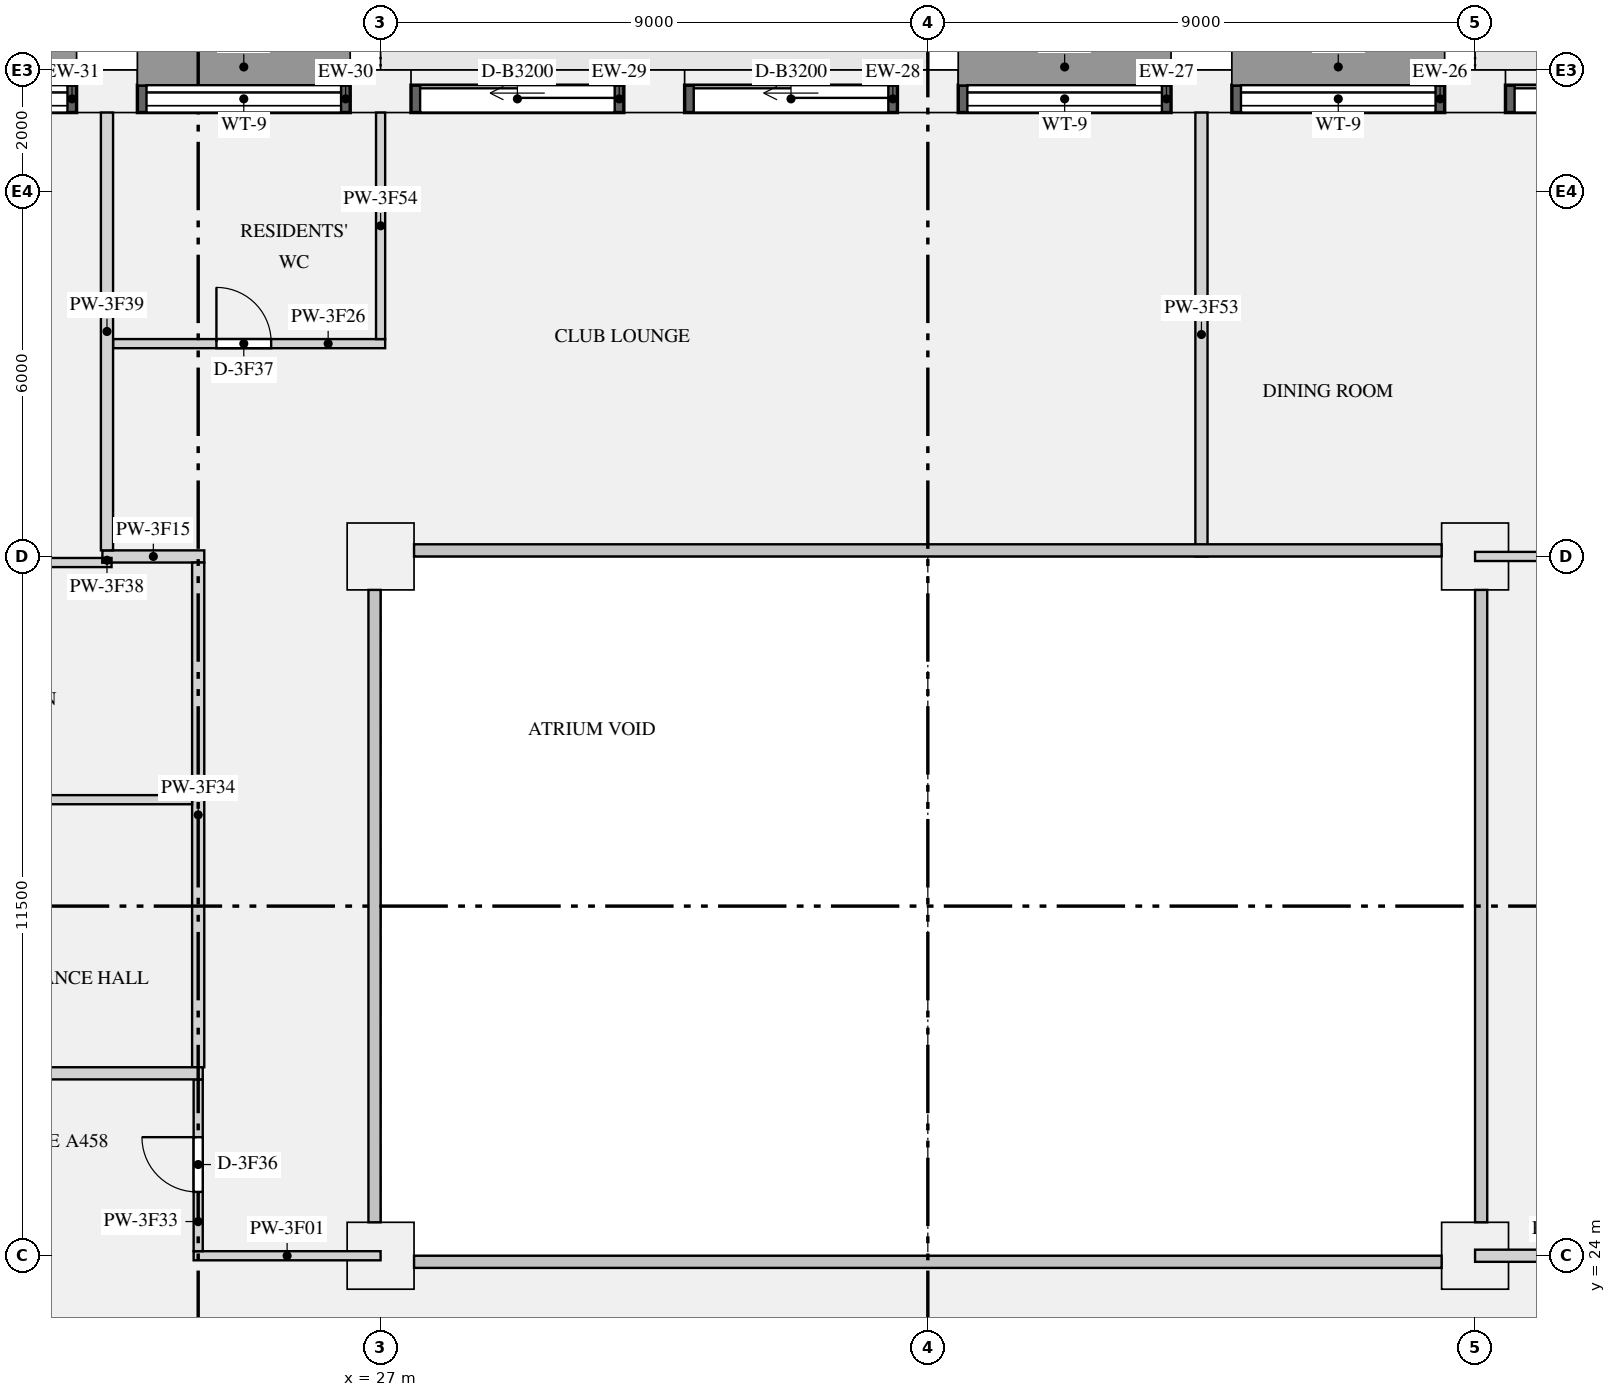
"""IFC4 building model, lengths in metres.
Left out: names, types, materials, properties, quantities, classifications, styles, units other than length and angle.
Written with IfcOpenShell. Run it as: python <this file> out.ifc"""

import sys

from ifc_helpers import new_model, si_unit, direction, frame, frame_2d, origin, origin_2d, place, context, subcontext, project, spatial, rectangle, extrude, element, fill, save


model = new_model("IFC4")
c1 = context("Model", 3, precision=1e-05, world=origin(), true_north=direction((0.0, 1.0)))
c2 = subcontext(c1, "Body", "Model", "MODEL_VIEW")
j1 = project(units=[si_unit("LENGTHUNIT", "METRE"), si_unit("PLANEANGLEUNIT", "RADIAN")], contexts=[c1])
p1 = place(None, origin())
s1 = spatial("IfcSite", under=j1, at=p1, CompositionType="ELEMENT")
p2 = place(p1, origin())
s2 = spatial("IfcBuilding", under=s1, at=p2, CompositionType="ELEMENT")
p3 = place(p2, frame((0.0, 0.0, 179.1)))
s3 = spatial("IfcBuildingStorey", under=s2, at=p3, CompositionType="ELEMENT", Elevation=179.1)
for number, where, z_axis, x_axis in (
    (1, (45.0, 43.15, 0.0), (0.0, 0.0, 1.0), (-1.0, 0.0, 0.0)),
    (2, (40.5, 43.15, 0.0), (0.0, 0.0, 1.0), (-1.0, 0.0, 0.0)),
    (3, (36.0, 43.15, 0.0), (0.0, 0.0, 1.0), (-1.0, 0.0, 0.0)),
    (4, (31.5, 43.15, 0.0), (0.0, 0.0, 1.0), (-1.0, 0.0, 0.0)),
    (5, (27.0, 43.15, 0.0), (0.0, 0.0, 1.0), (-1.0, 0.0, 0.0)),
    (6, (22.5, 43.15, 0.0), (0.0, 0.0, 1.0), (-1.0, 0.0, 0.0)),
):
    element("IfcColumn", number, at=place(p3, frame(where, z_axis=z_axis, x_axis=x_axis)), inside=s3, PredefinedType="USERDEFINED", context=c2, shape_type="SweptSolid", body=[
        extrude(rectangle(XDim=1.0, YDim=0.7, at=origin_2d()), origin(), (0.0, 0.0, 1.0), 3.15),
    ])
for number, where, z_axis, x_axis in (
    (7, (27.0, 24.0, 0.0), (0.0, 0.0, 1.0), (1.0, 0.0, 0.0)),
    (8, (45.0, 24.0, 0.0), (0.0, 0.0, 1.0), (1.0, 0.0, 0.0)),
    (9, (27.0, 35.5, 0.0), (0.0, 0.0, 1.0), (1.0, 0.0, 0.0)),
    (10, (45.0, 35.5, 0.0), (0.0, 0.0, 1.0), (1.0, 0.0, 0.0)),
):
    element("IfcColumn", number, at=place(p3, frame(where, z_axis=z_axis, x_axis=x_axis)), inside=s3, PredefinedType="COLUMN", context=c2, shape_type="SweptSolid", body=[
        extrude(rectangle(XDim=1.1, YDim=1.1, at=origin_2d()), origin(), (0.0, 0.0, 1.0), 3.15),
    ])
p4 = place(p3, frame((49.0, 43.025, 0.0), z_axis=(0.0, 0.0, 1.0), x_axis=(-1.0, 0.0, 0.0)))
e11 = element("IfcWall", 11, at=p4, inside=s3, PredefinedType="SOLIDWALL", context=c2, shape_type="SweptSolid", body=[
    extrude(rectangle(XDim=3.5, YDim=0.45, at=frame_2d((1.75, 0.0))), origin(), (0.0, 0.0, 1.0), 2.83),
])
p5 = place(p4, frame((0.15, 0.0, 0.0)))
e12 = element("IfcOpeningElement", 12, at=p5, cuts=e11, PredefinedType="OPENING", context=c2, shape_type="SweptSolid", body=[
    extrude(rectangle(XDim=3.2, YDim=2.3, at=frame_2d((1.6, 1.15))), frame((0.0, 0.235, 0.0), z_axis=(0.0, -1.0, 0.0), x_axis=(1.0, 0.0, 0.0)), (0.0, 0.0, 1.0), 0.47),
])
p6 = place(p3, frame((44.5, 43.025, 0.9), z_axis=(0.0, 0.0, 1.0), x_axis=(-1.0, 0.0, 0.0)))
e13 = element("IfcWall", 13, at=p6, inside=s3, PredefinedType="SOLIDWALL", context=c2, shape_type="SweptSolid", body=[
    extrude(rectangle(XDim=3.5, YDim=0.45, at=frame_2d((1.75, 0.0))), origin(), (0.0, 0.0, 1.0), 1.93),
])
p7 = place(p6, frame((0.15, 0.0, 0.15)))
e14 = element("IfcOpeningElement", 14, at=p7, cuts=e13, PredefinedType="OPENING", context=c2, shape_type="SweptSolid", body=[
    extrude(rectangle(XDim=3.2, YDim=1.5, at=frame_2d((1.6, 0.75))), frame((0.0, 0.235, 0.0), z_axis=(0.0, -1.0, 0.0), x_axis=(1.0, 0.0, 0.0)), (0.0, 0.0, 1.0), 0.47),
])
p8 = place(p3, frame((40.0, 43.025, 0.9), z_axis=(0.0, 0.0, 1.0), x_axis=(-1.0, 0.0, 0.0)))
e15 = element("IfcWall", 15, at=p8, inside=s3, PredefinedType="SOLIDWALL", context=c2, shape_type="SweptSolid", body=[
    extrude(rectangle(XDim=3.5, YDim=0.45, at=frame_2d((1.75, 0.0))), origin(), (0.0, 0.0, 1.0), 1.93),
])
p9 = place(p8, frame((0.15, 0.0, 0.15)))
e16 = element("IfcOpeningElement", 16, at=p9, cuts=e15, PredefinedType="OPENING", context=c2, shape_type="SweptSolid", body=[
    extrude(rectangle(XDim=3.2, YDim=1.5, at=frame_2d((1.6, 0.75))), frame((0.0, 0.235, 0.0), z_axis=(0.0, -1.0, 0.0), x_axis=(1.0, 0.0, 0.0)), (0.0, 0.0, 1.0), 0.47),
])
p10 = place(p3, frame((35.5, 43.025, 0.0), z_axis=(0.0, 0.0, 1.0), x_axis=(-1.0, 0.0, 0.0)))
e17 = element("IfcWall", 17, at=p10, inside=s3, PredefinedType="SOLIDWALL", context=c2, shape_type="SweptSolid", body=[
    extrude(rectangle(XDim=3.5, YDim=0.45, at=frame_2d((1.75, 0.0))), origin(), (0.0, 0.0, 1.0), 2.83),
])
p11 = place(p10, frame((0.15, 0.0, 0.0)))
e18 = element("IfcOpeningElement", 18, at=p11, cuts=e17, PredefinedType="OPENING", context=c2, shape_type="SweptSolid", body=[
    extrude(rectangle(XDim=3.2, YDim=2.3, at=frame_2d((1.6, 1.15))), frame((0.0, 0.235, 0.0), z_axis=(0.0, -1.0, 0.0), x_axis=(1.0, 0.0, 0.0)), (0.0, 0.0, 1.0), 0.47),
])
p12 = place(p3, frame((31.0, 43.025, 0.0), z_axis=(0.0, 0.0, 1.0), x_axis=(-1.0, 0.0, 0.0)))
e19 = element("IfcWall", 19, at=p12, inside=s3, PredefinedType="SOLIDWALL", context=c2, shape_type="SweptSolid", body=[
    extrude(rectangle(XDim=3.5, YDim=0.45, at=frame_2d((1.75, 0.0))), origin(), (0.0, 0.0, 1.0), 2.83),
])
p13 = place(p12, frame((0.15, 0.0, 0.0)))
e20 = element("IfcOpeningElement", 20, at=p13, cuts=e19, PredefinedType="OPENING", context=c2, shape_type="SweptSolid", body=[
    extrude(rectangle(XDim=3.2, YDim=2.3, at=frame_2d((1.6, 1.15))), frame((0.0, 0.235, 0.0), z_axis=(0.0, -1.0, 0.0), x_axis=(1.0, 0.0, 0.0)), (0.0, 0.0, 1.0), 0.47),
])
p14 = place(p3, frame((26.5, 43.025, 0.9), z_axis=(0.0, 0.0, 1.0), x_axis=(-1.0, 0.0, 0.0)))
e21 = element("IfcWall", 21, at=p14, inside=s3, PredefinedType="SOLIDWALL", context=c2, shape_type="SweptSolid", body=[
    extrude(rectangle(XDim=3.5, YDim=0.45, at=frame_2d((1.75, 0.0))), origin(), (0.0, 0.0, 1.0), 1.93),
])
p15 = place(p14, frame((0.15, 0.0, 0.15)))
e22 = element("IfcOpeningElement", 22, at=p15, cuts=e21, PredefinedType="OPENING", context=c2, shape_type="SweptSolid", body=[
    extrude(rectangle(XDim=3.2, YDim=1.5, at=frame_2d((1.6, 0.75))), frame((0.0, 0.235, 0.0), z_axis=(0.0, -1.0, 0.0), x_axis=(1.0, 0.0, 0.0)), (0.0, 0.0, 1.0), 0.47),
])
p16 = place(p3, frame((22.0, 43.025, 0.9), z_axis=(0.0, 0.0, 1.0), x_axis=(-1.0, 0.0, 0.0)))
e23 = element("IfcWall", 23, at=p16, inside=s3, PredefinedType="SOLIDWALL", context=c2, shape_type="SweptSolid", body=[
    extrude(rectangle(XDim=3.5, YDim=0.45, at=frame_2d((1.75, 0.0))), origin(), (0.0, 0.0, 1.0), 1.93),
])
p17 = place(p16, frame((0.15, 0.0, 0.15)))
e24 = element("IfcOpeningElement", 24, at=p17, cuts=e23, PredefinedType="OPENING", context=c2, shape_type="SweptSolid", body=[
    extrude(rectangle(XDim=3.2, YDim=1.5, at=frame_2d((1.6, 0.75))), frame((0.0, 0.235, 0.0), z_axis=(0.0, -1.0, 0.0), x_axis=(1.0, 0.0, 0.0)), (0.0, 0.0, 1.0), 0.47),
])
p18 = place(p3, frame((23.925, 24.0, 0.0), z_axis=(0.0, 0.0, 1.0), x_axis=(1.0, 0.0, 0.0)))
e25 = element("IfcWall", 25, at=p18, inside=s3, PredefinedType="PARTITIONING", context=c2, shape_type="SweptSolid", body=[
    extrude(rectangle(XDim=3.075, YDim=0.15, at=frame_2d((1.538, 0.0))), origin(), (0.0, 0.0, 1.0), 2.83),
])
p19 = place(p3, frame((45.0, 24.0, 0.0), z_axis=(0.0, 0.0, 1.0), x_axis=(1.0, 0.0, 0.0)))
e26 = element("IfcWall", 26, at=p19, inside=s3, PredefinedType="PARTITIONING", context=c2, shape_type="SweptSolid", body=[
    extrude(rectangle(XDim=3.1, YDim=0.2, at=frame_2d((1.55, 0.0))), origin(), (0.0, 0.0, 1.0), 2.83),
])
p20 = place(p3, frame((17.1, 27.0, 0.0), z_axis=(0.0, 0.0, 1.0), x_axis=(1.0, 0.0, 0.0)))
e27 = element("IfcWall", 27, at=p20, inside=s3, PredefinedType="PARTITIONING", context=c2, shape_type="SweptSolid", body=[
    extrude(rectangle(XDim=6.975, YDim=0.2, at=frame_2d((3.487, 0.0))), origin(), (0.0, 0.0, 1.0), 2.83),
])
p21 = place(p20, frame((3.35, 0.0, 0.0)))
e28 = element("IfcOpeningElement", 28, at=p21, cuts=e27, PredefinedType="OPENING", context=c2, shape_type="SweptSolid", body=[
    extrude(rectangle(XDim=1.1, YDim=2.1, at=frame_2d((0.55, 1.05))), frame((0.0, 0.11, 0.0), z_axis=(0.0, -1.0, 0.0), x_axis=(1.0, 0.0, 0.0)), (0.0, 0.0, 1.0), 0.22),
])
p22 = place(p3, frame((15.8, 31.5, 0.0), z_axis=(0.0, 0.0, 1.0), x_axis=(1.0, 0.0, 0.0)))
e29 = element("IfcWall", 29, at=p22, inside=s3, PredefinedType="PARTITIONING", context=c2, shape_type="SweptSolid", body=[
    extrude(rectangle(XDim=8.1, YDim=0.15, at=frame_2d((4.05, 0.0))), origin(), (0.0, 0.0, 1.0), 2.83),
])
p23 = place(p22, frame((4.0, 0.0, 0.0)))
e30 = element("IfcOpeningElement", 30, at=p23, cuts=e29, PredefinedType="OPENING", context=c2, shape_type="SweptSolid", body=[
    extrude(rectangle(XDim=0.9, YDim=2.1, at=frame_2d((0.45, 1.05))), frame((0.0, 0.085, 0.0), z_axis=(0.0, -1.0, 0.0), x_axis=(1.0, 0.0, 0.0)), (0.0, 0.0, 1.0), 0.17),
])
p24 = place(p3, frame((15.8, 35.4, 0.0), z_axis=(0.0, 0.0, 1.0), x_axis=(1.0, 0.0, 0.0)))
e31 = element("IfcWall", 31, at=p24, inside=s3, PredefinedType="PARTITIONING", context=c2, shape_type="SweptSolid", body=[
    extrude(rectangle(XDim=6.775, YDim=0.15, at=frame_2d((3.387, 0.0))), origin(), (0.0, 0.0, 1.0), 2.83),
])
p25 = place(p24, frame((3.975, 0.0, 0.0)))
e32 = element("IfcOpeningElement", 32, at=p25, cuts=e31, PredefinedType="OPENING", context=c2, shape_type="SweptSolid", body=[
    extrude(rectangle(XDim=1.5, YDim=2.1, at=frame_2d((0.75, 1.05))), frame((0.0, 0.085, 0.0), z_axis=(0.0, -1.0, 0.0), x_axis=(1.0, 0.0, 0.0)), (0.0, 0.0, 1.0), 0.17),
])
p26 = place(p3, frame((45.0, 35.5, 0.0), z_axis=(0.0, 0.0, 1.0), x_axis=(1.0, 0.0, 0.0)))
e33 = element("IfcWall", 33, at=p26, inside=s3, PredefinedType="PARTITIONING", context=c2, shape_type="SweptSolid", body=[
    extrude(rectangle(XDim=4.425, YDim=0.15, at=frame_2d((2.212, 0.0))), origin(), (0.0, 0.0, 1.0), 2.83),
])
p27 = place(p3, frame((22.425, 35.5, 0.0), z_axis=(0.0, 0.0, 1.0), x_axis=(1.0, 0.0, 0.0)))
e34 = element("IfcWall", 34, at=p27, inside=s3, PredefinedType="PARTITIONING", context=c2, shape_type="SweptSolid", body=[
    extrude(rectangle(XDim=1.675, YDim=0.2, at=frame_2d((0.837, 0.0))), origin(), (0.0, 0.0, 1.0), 2.83),
])
p28 = place(p3, frame((22.6, 39.0, 0.0), z_axis=(0.0, 0.0, 1.0), x_axis=(1.0, 0.0, 0.0)))
e35 = element("IfcWall", 35, at=p28, inside=s3, PredefinedType="PARTITIONING", context=c2, shape_type="SweptSolid", body=[
    extrude(rectangle(XDim=4.475, YDim=0.15, at=frame_2d((2.237, 0.0))), origin(), (0.0, 0.0, 1.0), 2.83),
])
p29 = place(p28, frame((1.7, 0.0, 0.0)))
e36 = element("IfcOpeningElement", 36, at=p29, cuts=e35, PredefinedType="OPENING", context=c2, shape_type="SweptSolid", body=[
    extrude(rectangle(XDim=0.9, YDim=2.1, at=frame_2d((0.45, 1.05))), frame((0.0, 0.085, 0.0), z_axis=(0.0, -1.0, 0.0), x_axis=(1.0, 0.0, 0.0)), (0.0, 0.0, 1.0), 0.17),
])
p30 = place(p3, frame((24.0, 24.075, 0.0), z_axis=(0.0, 0.0, 1.0), x_axis=(0.0, 1.0, 0.0)))
e37 = element("IfcWall", 37, at=p30, inside=s3, PredefinedType="PARTITIONING", context=c2, shape_type="SweptSolid", body=[
    extrude(rectangle(XDim=2.825, YDim=0.15, at=frame_2d((1.413, 0.0))), origin(), (0.0, 0.0, 1.0), 2.83),
])
p31 = place(p30, frame((0.975, 0.0, 0.0)))
e38 = element("IfcOpeningElement", 38, at=p31, cuts=e37, PredefinedType="OPENING", context=c2, shape_type="SweptSolid", body=[
    extrude(rectangle(XDim=0.9, YDim=2.1, at=frame_2d((0.45, 1.05))), frame((0.0, 0.085, 0.0), z_axis=(0.0, -1.0, 0.0), x_axis=(1.0, 0.0, 0.0)), (0.0, 0.0, 1.0), 0.17),
])
p32 = place(p3, frame((24.0, 27.1, 0.0), z_axis=(0.0, 0.0, 1.0), x_axis=(0.0, 1.0, 0.0)))
e39 = element("IfcWall", 39, at=p32, inside=s3, PredefinedType="PARTITIONING", context=c2, shape_type="SweptSolid", body=[
    extrude(rectangle(XDim=8.3, YDim=0.2, at=frame_2d((4.15, 0.0))), origin(), (0.0, 0.0, 1.0), 2.83),
])
p33 = place(p3, frame((22.5, 35.4, 0.0), z_axis=(0.0, 0.0, 1.0), x_axis=(0.0, 1.0, 0.0)))
e40 = element("IfcWall", 40, at=p33, inside=s3, PredefinedType="PARTITIONING", context=c2, shape_type="SweptSolid", body=[
    extrude(rectangle(XDim=0.075, YDim=0.15, at=frame_2d((0.038, 0.0))), origin(), (0.0, 0.0, 1.0), 2.83),
])
p34 = place(p3, frame((22.5, 35.6, 0.0), z_axis=(0.0, 0.0, 1.0), x_axis=(0.0, 1.0, 0.0)))
e41 = element("IfcWall", 41, at=p34, inside=s3, PredefinedType="PARTITIONING", context=c2, shape_type="SweptSolid", body=[
    extrude(rectangle(XDim=7.2, YDim=0.2, at=frame_2d((3.6, 0.0))), origin(), (0.0, 0.0, 1.0), 2.83),
])
p35 = place(p3, frame((40.5, 35.5, 0.0), z_axis=(0.0, 0.0, 1.0), x_axis=(0.0, 1.0, 0.0)))
e42 = element("IfcWall", 42, at=p35, inside=s3, PredefinedType="PARTITIONING", context=c2, shape_type="SweptSolid", body=[
    extrude(rectangle(XDim=7.3, YDim=0.2, at=frame_2d((3.65, 0.0))), origin(), (0.0, 0.0, 1.0), 2.83),
])
p36 = place(p3, frame((27.0, 39.075, 0.0), z_axis=(0.0, 0.0, 1.0), x_axis=(0.0, 1.0, 0.0)))
e43 = element("IfcWall", 43, at=p36, inside=s3, PredefinedType="PARTITIONING", context=c2, shape_type="SweptSolid", body=[
    extrude(rectangle(XDim=3.725, YDim=0.15, at=frame_2d((1.863, 0.0))), origin(), (0.0, 0.0, 1.0), 2.83),
])
p37 = place(p5, origin())
e44 = element("IfcDoor", 44, at=p37, inside=s3, OperationType="SLIDING_TO_LEFT", PredefinedType="DOOR", context=c2, shape_type="SweptSolid", body=[
    extrude(rectangle(XDim=3.2, YDim=2.3, at=frame_2d((1.6, 1.15))), frame((0.0, -0.07, 0.0), z_axis=(0.0, -1.0, 0.0), x_axis=(1.0, 0.0, 0.0)), (0.0, 0.0, 1.0), 0.05),
])
fill(e12, e44)
p38 = place(p7, origin())
e45 = element("IfcWindow", 45, at=p38, inside=s3, PartitioningType="SINGLE_PANEL", PredefinedType="WINDOW", context=c2, shape_type="SweptSolid", body=[
    extrude(rectangle(XDim=3.2, YDim=1.5, at=frame_2d((1.6, 0.75))), frame((0.0, -0.065, 0.0), z_axis=(0.0, -1.0, 0.0), x_axis=(1.0, 0.0, 0.0)), (0.0, 0.0, 1.0), 0.06),
])
fill(e14, e45)
p39 = place(p9, origin())
e46 = element("IfcWindow", 46, at=p39, inside=s3, PartitioningType="SINGLE_PANEL", PredefinedType="WINDOW", context=c2, shape_type="SweptSolid", body=[
    extrude(rectangle(XDim=3.2, YDim=1.5, at=frame_2d((1.6, 0.75))), frame((0.0, -0.065, 0.0), z_axis=(0.0, -1.0, 0.0), x_axis=(1.0, 0.0, 0.0)), (0.0, 0.0, 1.0), 0.06),
])
fill(e16, e46)
p40 = place(p11, origin())
e47 = element("IfcDoor", 47, at=p40, inside=s3, OperationType="SLIDING_TO_LEFT", PredefinedType="DOOR", context=c2, shape_type="SweptSolid", body=[
    extrude(rectangle(XDim=3.2, YDim=2.3, at=frame_2d((1.6, 1.15))), frame((0.0, -0.07, 0.0), z_axis=(0.0, -1.0, 0.0), x_axis=(1.0, 0.0, 0.0)), (0.0, 0.0, 1.0), 0.05),
])
fill(e18, e47)
p41 = place(p13, origin())
e48 = element("IfcDoor", 48, at=p41, inside=s3, OperationType="SLIDING_TO_LEFT", PredefinedType="DOOR", context=c2, shape_type="SweptSolid", body=[
    extrude(rectangle(XDim=3.2, YDim=2.3, at=frame_2d((1.6, 1.15))), frame((0.0, -0.07, 0.0), z_axis=(0.0, -1.0, 0.0), x_axis=(1.0, 0.0, 0.0)), (0.0, 0.0, 1.0), 0.05),
])
fill(e20, e48)
p42 = place(p15, origin())
e49 = element("IfcWindow", 49, at=p42, inside=s3, PartitioningType="SINGLE_PANEL", PredefinedType="WINDOW", context=c2, shape_type="SweptSolid", body=[
    extrude(rectangle(XDim=3.2, YDim=1.5, at=frame_2d((1.6, 0.75))), frame((0.0, -0.065, 0.0), z_axis=(0.0, -1.0, 0.0), x_axis=(1.0, 0.0, 0.0)), (0.0, 0.0, 1.0), 0.06),
])
fill(e22, e49)
p43 = place(p17, origin())
e50 = element("IfcWindow", 50, at=p43, inside=s3, PartitioningType="SINGLE_PANEL", PredefinedType="WINDOW", context=c2, shape_type="SweptSolid", body=[
    extrude(rectangle(XDim=3.2, YDim=1.5, at=frame_2d((1.6, 0.75))), frame((0.0, -0.065, 0.0), z_axis=(0.0, -1.0, 0.0), x_axis=(1.0, 0.0, 0.0)), (0.0, 0.0, 1.0), 0.06),
])
fill(e24, e50)
p44 = place(p31, origin())
e51 = element("IfcDoor", 51, at=p44, inside=s3, OperationType="SINGLE_SWING_RIGHT", PredefinedType="DOOR", context=c2, shape_type="SweptSolid", body=[
    extrude(rectangle(XDim=0.9, YDim=2.1, at=frame_2d((0.45, 1.05))), frame((0.0, 0.025, 0.0), z_axis=(0.0, -1.0, 0.0), x_axis=(1.0, 0.0, 0.0)), (0.0, 0.0, 1.0), 0.05),
])
fill(e38, e51)
p45 = place(p29, origin())
e52 = element("IfcDoor", 52, at=p45, inside=s3, OperationType="SINGLE_SWING_LEFT", PredefinedType="DOOR", context=c2, shape_type="SweptSolid", body=[
    extrude(rectangle(XDim=0.9, YDim=2.1, at=frame_2d((0.45, 1.05))), frame((0.0, 0.025, 0.0), z_axis=(0.0, -1.0, 0.0), x_axis=(1.0, 0.0, 0.0)), (0.0, 0.0, 1.0), 0.05),
])
fill(e36, e52)
save(model, sys.argv[1])
